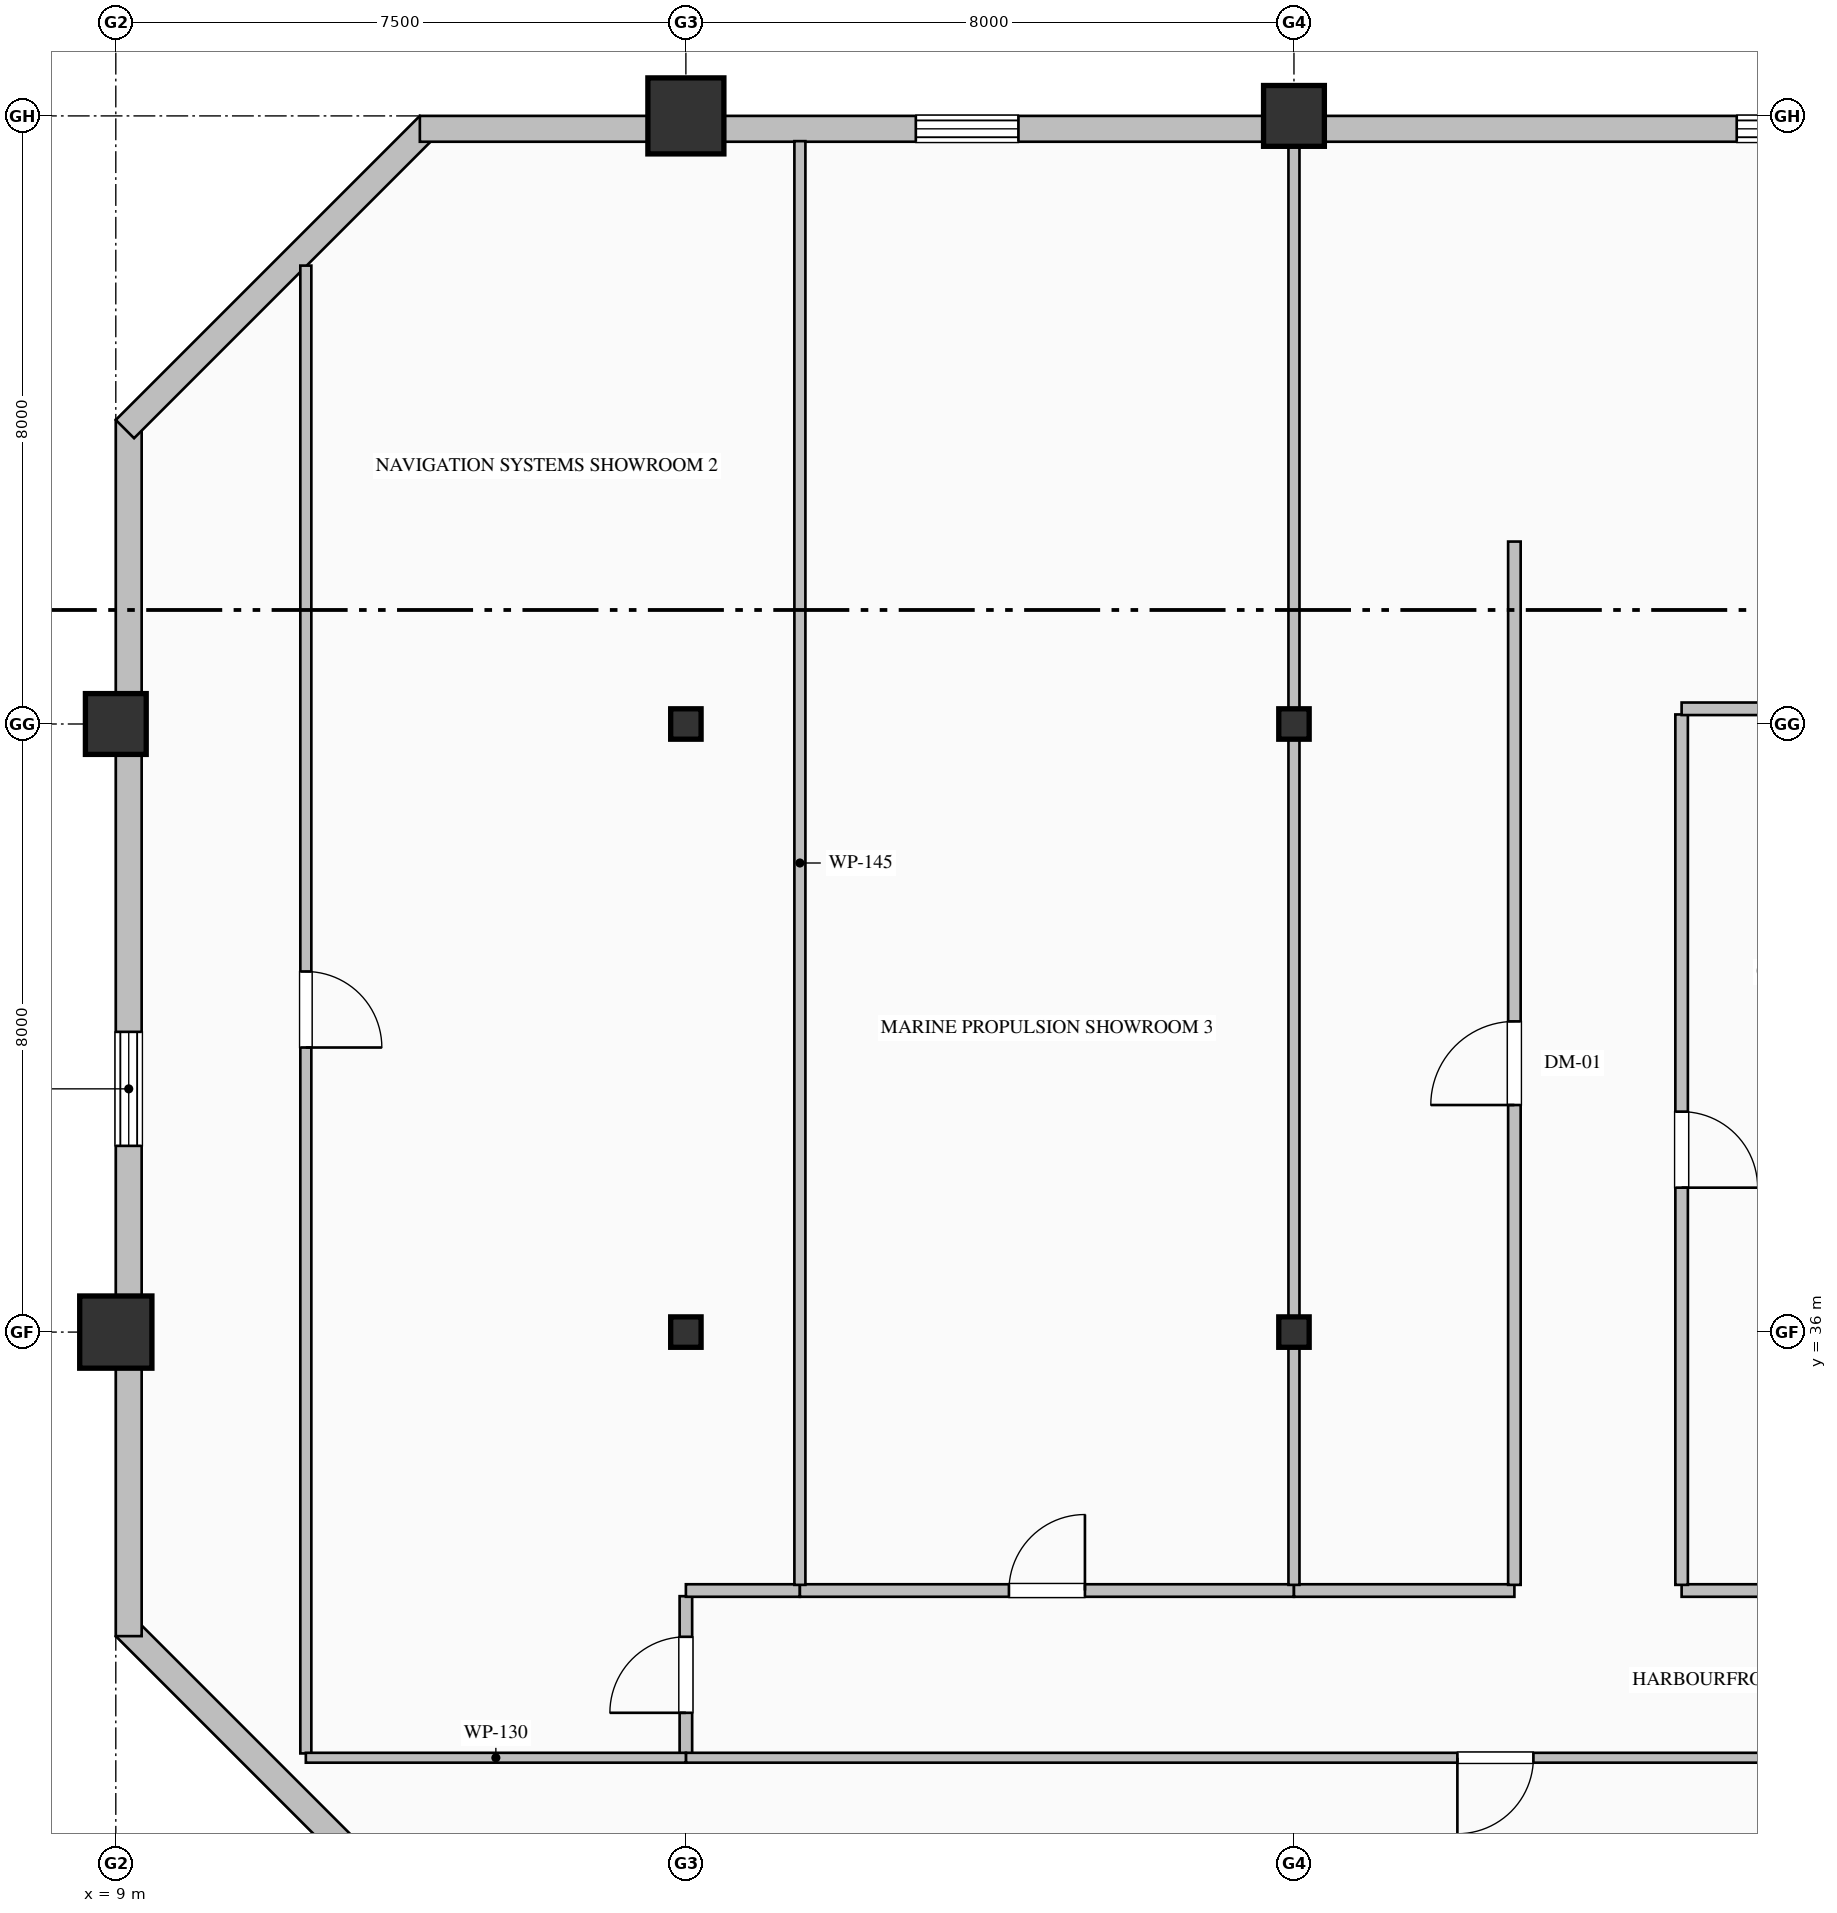
"""IFC4 building model, lengths in metres.
Left out: names, types, materials, properties, quantities, classifications, styles, units other than length and angle.
Written with IfcOpenShell. Run it as: python <this file> out.ifc"""

import sys

from ifc_helpers import new_model, si_unit, direction, frame, frame_2d, origin, origin_2d, place, context, subcontext, project, spatial, rectangle, hollow_rectangle, hollow_circle, i_section, extrude, element, fill, save


model = new_model("IFC4")
c1 = context("Model", 3, precision=1e-05, world=origin(), true_north=direction((0.0, 1.0)))
c2 = subcontext(c1, "Body", "Model", "MODEL_VIEW")
j1 = project(units=[si_unit("LENGTHUNIT", "METRE"), si_unit("PLANEANGLEUNIT", "RADIAN")], contexts=[c1])
p1 = place(None, origin())
s1 = spatial("IfcSite", under=j1, at=p1, CompositionType="ELEMENT")
p2 = place(p1, origin())
s2 = spatial("IfcBuilding", under=s1, at=p2, CompositionType="ELEMENT")
p3 = place(p2, frame((0.0, 0.0, 265.8)))
s3 = spatial("IfcBuildingStorey", under=s2, at=p3, CompositionType="ELEMENT", Elevation=265.8)
p4 = place(p3, frame((9.0, 36.0, 0.0), z_axis=(0.0, 0.0, 1.0), x_axis=(1.0, 0.0, 0.0)))
e1 = element("IfcColumn", 1, at=p4, inside=s3, PredefinedType="COLUMN", context=c2, shape_type="SweptSolid", body=[
    extrude(hollow_rectangle(XDim=0.95, YDim=0.95, WallThickness=0.036, at=origin_2d()), origin(), (0.0, 0.0, 1.0), 4.0),
])
p5 = place(p3, frame((9.0, 44.0, 0.0), z_axis=(0.0, 0.0, 1.0), x_axis=(1.0, 0.0, 0.0)))
e2 = element("IfcColumn", 2, at=p5, inside=s3, PredefinedType="COLUMN", context=c2, shape_type="SweptSolid", body=[
    extrude(hollow_rectangle(XDim=0.8, YDim=0.8, WallThickness=0.032, at=origin_2d()), origin(), (0.0, 0.0, 1.0), 4.0),
])
for number, where, z_axis, x_axis in (
    (3, (16.5, 36.0, 0.0), (0.0, 0.0, 1.0), (1.0, 0.0, 0.0)),
    (4, (16.5, 44.0, 0.0), (0.0, 0.0, 1.0), (1.0, 0.0, 0.0)),
):
    element("IfcColumn", number, at=place(p3, frame(where, z_axis=z_axis, x_axis=x_axis)), inside=s3, PredefinedType="COLUMN", context=c2, shape_type="SweptSolid", body=[
        extrude(i_section(OverallWidth=0.4, OverallDepth=0.4, WebThickness=0.013, FlangeThickness=0.021, FilletRadius=0.022, at=origin_2d()), origin(), (0.0, 0.0, 1.0), 4.0),
    ])
p6 = place(p3, frame((16.5, 52.0, 0.0), z_axis=(0.0, 0.0, 1.0), x_axis=(1.0, 0.0, 0.0)))
e5 = element("IfcColumn", 5, at=p6, inside=s3, PredefinedType="COLUMN", context=c2, shape_type="SweptSolid", body=[
    extrude(hollow_circle(Radius=0.5, WallThickness=0.036, at=origin_2d()), origin(), (0.0, 0.0, 1.0), 4.0),
])
for number, where, z_axis, x_axis in (
    (6, (24.5, 36.0, 0.0), (0.0, 0.0, 1.0), (1.0, 0.0, 0.0)),
    (7, (24.5, 44.0, 0.0), (0.0, 0.0, 1.0), (1.0, 0.0, 0.0)),
):
    element("IfcColumn", number, at=place(p3, frame(where, z_axis=z_axis, x_axis=x_axis)), inside=s3, PredefinedType="COLUMN", context=c2, shape_type="SweptSolid", body=[
        extrude(i_section(OverallWidth=0.4, OverallDepth=0.4, WebThickness=0.013, FlangeThickness=0.021, FilletRadius=0.022, at=origin_2d()), origin(), (0.0, 0.0, 1.0), 4.0),
    ])
p7 = place(p3, frame((24.5, 52.0, 0.0), z_axis=(0.0, 0.0, 1.0), x_axis=(1.0, 0.0, 0.0)))
e8 = element("IfcColumn", 8, at=p7, inside=s3, PredefinedType="COLUMN", context=c2, shape_type="SweptSolid", body=[
    extrude(hollow_rectangle(XDim=0.8, YDim=0.8, WallThickness=0.032, at=origin_2d()), origin(), (0.0, 0.0, 1.0), 4.0),
])
p8 = place(p3, frame((13.12, 28.12, 0.0), z_axis=(0.0, 0.0, 1.0), x_axis=(-0.707106781187, 0.707106781187, 0.0)))
e9 = element("IfcWall", 9, at=p8, inside=s3, PredefinedType="SOLIDWALL", context=c2, shape_type="SweptSolid", body=[
    extrude(rectangle(XDim=5.657, YDim=0.34, at=frame_2d((2.828, 0.0))), origin(), (0.0, 0.0, 1.0), 3.775),
])
p9 = place(p3, frame((9.17, 32.0, 0.0), z_axis=(0.0, 0.0, 1.0), x_axis=(0.0, 1.0, 0.0)))
e10 = element("IfcWall", 10, at=p9, inside=s3, PredefinedType="SOLIDWALL", context=c2, shape_type="SweptSolid", body=[
    extrude(rectangle(XDim=16.0, YDim=0.34, at=frame_2d((8.0, 0.0))), origin(), (0.0, 0.0, 1.0), 3.325),
])
p10 = place(p9, frame((6.45, 0.0, 0.7)))
e11 = element("IfcOpeningElement", 11, at=p10, cuts=e10, PredefinedType="OPENING", context=c2, shape_type="SweptSolid", body=[
    extrude(rectangle(XDim=1.5, YDim=2.4, at=frame_2d((0.75, 1.2))), frame((0.0, 0.18, 0.0), z_axis=(0.0, -1.0, 0.0), x_axis=(1.0, 0.0, 0.0)), (0.0, 0.0, 1.0), 0.36),
])
p11 = place(p3, frame((9.12, 47.88, 0.0), z_axis=(0.0, 0.0, 1.0), x_axis=(0.707106781187, 0.707106781187, 0.0)))
e12 = element("IfcWall", 12, at=p11, inside=s3, PredefinedType="SOLIDWALL", context=c2, shape_type="SweptSolid", body=[
    extrude(rectangle(XDim=5.657, YDim=0.34, at=frame_2d((2.828, 0.0))), origin(), (0.0, 0.0, 1.0), 3.775),
])
p12 = place(p3, frame((13.0, 51.83, 0.0), z_axis=(0.0, 0.0, 1.0), x_axis=(1.0, 0.0, 0.0)))
e13 = element("IfcWall", 13, at=p12, inside=s3, PredefinedType="SOLIDWALL", context=c2, shape_type="SweptSolid", body=[
    extrude(rectangle(XDim=27.52, YDim=0.34, at=frame_2d((13.76, 0.0))), origin(), (0.0, 0.0, 1.0), 3.325),
])
p13 = place(p12, frame((6.525, 0.0, 0.9)))
e14 = element("IfcOpeningElement", 14, at=p13, cuts=e13, PredefinedType="OPENING", context=c2, shape_type="SweptSolid", body=[
    extrude(rectangle(XDim=1.35, YDim=1.85, at=frame_2d((0.675, 0.925))), frame((0.0, 0.18, 0.0), z_axis=(0.0, -1.0, 0.0), x_axis=(1.0, 0.0, 0.0)), (0.0, 0.0, 1.0), 0.36),
])
p14 = place(p12, frame((17.325, 0.0, 0.9)))
e15 = element("IfcOpeningElement", 15, at=p14, cuts=e13, PredefinedType="OPENING", context=c2, shape_type="SweptSolid", body=[
    extrude(rectangle(XDim=1.35, YDim=1.85, at=frame_2d((0.675, 0.925))), frame((0.0, 0.18, 0.0), z_axis=(0.0, -1.0, 0.0), x_axis=(1.0, 0.0, 0.0)), (0.0, 0.0, 1.0), 0.36),
])
p15 = place(p3, frame((16.5, 30.457, 0.0), z_axis=(0.0, 0.0, 1.0), x_axis=(0.0, 1.0, 0.0)))
e16 = element("IfcWall", 16, at=p15, inside=s3, PredefinedType="PARTITIONING", context=c2, shape_type="SweptSolid", body=[
    extrude(rectangle(XDim=2.068, YDim=0.165, at=frame_2d((1.034, 0.0))), origin(), (0.0, 0.0, 1.0), 3.179),
])
p16 = place(p15, frame((0.534, 0.0, 0.0)))
e17 = element("IfcOpeningElement", 17, at=p16, cuts=e16, PredefinedType="OPENING", context=c2, shape_type="SweptSolid", body=[
    extrude(rectangle(XDim=1.0, YDim=2.15, at=frame_2d((0.5, 1.075))), frame((0.0, 0.093, 0.0), z_axis=(0.0, -1.0, 0.0), x_axis=(1.0, 0.0, 0.0)), (0.0, 0.0, 1.0), 0.185),
])
p17 = place(p3, frame((16.5, 32.6, 0.0), z_axis=(0.0, 0.0, 1.0), x_axis=(1.0, 0.0, 0.0)))
e18 = element("IfcWall", 18, at=p17, inside=s3, PredefinedType="PARTITIONING", context=c2, shape_type="SweptSolid", body=[
    extrude(rectangle(XDim=1.5, YDim=0.165, at=frame_2d((0.75, 0.0))), origin(), (0.0, 0.0, 1.0), 3.775),
])
p18 = place(p3, frame((18.0, 32.6, 0.0), z_axis=(0.0, 0.0, 1.0), x_axis=(1.0, 0.0, 0.0)))
e19 = element("IfcWall", 19, at=p18, inside=s3, PredefinedType="PARTITIONING", context=c2, shape_type="SweptSolid", body=[
    extrude(rectangle(XDim=6.5, YDim=0.165, at=frame_2d((3.25, 0.0))), origin(), (0.0, 0.0, 1.0), 3.775),
])
p19 = place(p18, frame((2.75, 0.0, 0.0)))
e20 = element("IfcOpeningElement", 20, at=p19, cuts=e19, PredefinedType="OPENING", context=c2, shape_type="SweptSolid", body=[
    extrude(rectangle(XDim=1.0, YDim=2.15, at=frame_2d((0.5, 1.075))), frame((0.0, 0.093, 0.0), z_axis=(0.0, -1.0, 0.0), x_axis=(1.0, 0.0, 0.0)), (0.0, 0.0, 1.0), 0.185),
])
p20 = place(p3, frame((24.5, 32.6, 0.0), z_axis=(0.0, 0.0, 1.0), x_axis=(1.0, 0.0, 0.0)))
e21 = element("IfcWall", 21, at=p20, inside=s3, PredefinedType="PARTITIONING", context=c2, shape_type="SweptSolid", body=[
    extrude(rectangle(XDim=2.9, YDim=0.165, at=frame_2d((1.45, 0.0))), origin(), (0.0, 0.0, 1.0), 3.775),
])
p21 = place(p3, frame((29.6, 32.6, 0.0), z_axis=(0.0, 0.0, 1.0), x_axis=(1.0, 0.0, 0.0)))
e22 = element("IfcWall", 22, at=p21, inside=s3, PredefinedType="PARTITIONING", context=c2, shape_type="SweptSolid", body=[
    extrude(rectangle(XDim=4.2, YDim=0.165, at=frame_2d((2.1, 0.0))), origin(), (0.0, 0.0, 1.0), 3.775),
])
p22 = place(p3, frame((37.8, 30.4, 0.0), z_axis=(0.0, 0.0, 1.0), x_axis=(-1.0, 0.0, 0.0)))
e23 = element("IfcWall", 23, at=p22, inside=s3, PredefinedType="PARTITIONING", context=c2, shape_type="SweptSolid", body=[
    extrude(rectangle(XDim=21.3, YDim=0.13, at=frame_2d((10.65, 0.0))), origin(), (0.0, 0.0, 1.0), 3.775),
])
p23 = place(p22, frame((10.15, 0.0, 0.0)))
e24 = element("IfcOpeningElement", 24, at=p23, cuts=e23, PredefinedType="OPENING", context=c2, shape_type="SweptSolid", body=[
    extrude(rectangle(XDim=1.0, YDim=2.15, at=frame_2d((0.5, 1.075))), frame((0.0, 0.075, 0.0), z_axis=(0.0, -1.0, 0.0), x_axis=(1.0, 0.0, 0.0)), (0.0, 0.0, 1.0), 0.15),
])
p24 = place(p3, frame((27.4, 32.675, 0.0), z_axis=(0.0, 0.0, 1.0), x_axis=(0.0, 1.0, 0.0)))
e25 = element("IfcWall", 25, at=p24, inside=s3, PredefinedType="PARTITIONING", context=c2, shape_type="SweptSolid", body=[
    extrude(rectangle(XDim=13.725, YDim=0.165, at=frame_2d((6.863, 0.0))), origin(), (0.0, 0.0, 1.0), 3.775),
])
p25 = place(p24, frame((6.313, 0.0, 0.0)))
e26 = element("IfcOpeningElement", 26, at=p25, cuts=e25, PredefinedType="OPENING", context=c2, shape_type="SweptSolid", body=[
    extrude(rectangle(XDim=1.1, YDim=2.2, at=frame_2d((0.55, 1.1))), frame((0.0, 0.093, 0.0), z_axis=(0.0, -1.0, 0.0), x_axis=(1.0, 0.0, 0.0)), (0.0, 0.0, 1.0), 0.185),
])
p26 = place(p3, frame((29.6, 44.125, 0.0), z_axis=(0.0, 0.0, 1.0), x_axis=(0.0, -1.0, 0.0)))
e27 = element("IfcWall", 27, at=p26, inside=s3, PredefinedType="PARTITIONING", context=c2, shape_type="SweptSolid", body=[
    extrude(rectangle(XDim=11.451, YDim=0.165, at=frame_2d((5.726, 0.0))), origin(), (0.0, 0.0, 1.0), 3.775),
])
p27 = place(p26, frame((5.226, 0.0, 0.0)))
e28 = element("IfcOpeningElement", 28, at=p27, cuts=e27, PredefinedType="OPENING", context=c2, shape_type="SweptSolid", body=[
    extrude(rectangle(XDim=1.0, YDim=2.15, at=frame_2d((0.5, 1.075))), frame((0.0, 0.093, 0.0), z_axis=(0.0, -1.0, 0.0), x_axis=(1.0, 0.0, 0.0)), (0.0, 0.0, 1.0), 0.185),
])
p28 = place(p3, frame((33.8, 44.2, 0.0), z_axis=(0.0, 0.0, 1.0), x_axis=(-1.0, 0.0, 0.0)))
e29 = element("IfcWall", 29, at=p28, inside=s3, PredefinedType="PARTITIONING", context=c2, shape_type="SweptSolid", body=[
    extrude(rectangle(XDim=4.2, YDim=0.165, at=frame_2d((2.1, 0.0))), origin(), (0.0, 0.0, 1.0), 3.775),
])
p29 = place(p3, frame((11.5, 50.031, 0.0), z_axis=(0.0, 0.0, 1.0), x_axis=(0.0, -1.0, 0.0)))
e30 = element("IfcWall", 30, at=p29, inside=s3, PredefinedType="PARTITIONING", context=c2, shape_type="SweptSolid", body=[
    extrude(rectangle(XDim=19.573, YDim=0.145, at=frame_2d((9.787, 0.0))), origin(), (0.0, 0.0, 1.0), 3.775),
])
p30 = place(p29, frame((9.287, 0.0, 0.0)))
e31 = element("IfcOpeningElement", 31, at=p30, cuts=e30, PredefinedType="OPENING", context=c2, shape_type="SweptSolid", body=[
    extrude(rectangle(XDim=1.0, YDim=2.15, at=frame_2d((0.5, 1.075))), frame((0.0, 0.083, 0.0), z_axis=(0.0, -1.0, 0.0), x_axis=(1.0, 0.0, 0.0)), (0.0, 0.0, 1.0), 0.165),
])
p31 = place(p3, frame((18.0, 51.668, 0.0), z_axis=(0.0, 0.0, 1.0), x_axis=(0.0, -1.0, 0.0)))
e32 = element("IfcWall", 32, at=p31, inside=s3, PredefinedType="PARTITIONING", context=c2, shape_type="SweptSolid", body=[
    extrude(rectangle(XDim=18.993, YDim=0.145, at=frame_2d((9.497, 0.0))), origin(), (0.0, 0.0, 1.0), 3.775),
])
p32 = place(p3, frame((16.5, 30.4, 0.0), z_axis=(0.0, 0.0, 1.0), x_axis=(-1.0, 0.0, 0.0)))
e33 = element("IfcWall", 33, at=p32, inside=s3, PredefinedType="PARTITIONING", context=c2, shape_type="SweptSolid", body=[
    extrude(rectangle(XDim=5.0, YDim=0.13, at=frame_2d((2.5, 0.0))), origin(), (0.0, 0.0, 1.0), 3.775),
])
p33 = place(p3, frame((24.5, 51.668, 0.0), z_axis=(0.0, 0.0, 1.0), x_axis=(0.0, -1.0, 0.0)))
e34 = element("IfcWall", 34, at=p33, inside=s3, PredefinedType="PARTITIONING", context=c2, shape_type="SweptSolid", body=[
    extrude(rectangle(XDim=18.993, YDim=0.145, at=frame_2d((9.497, 0.0))), origin(), (0.0, 0.0, 1.0), 3.179),
])
p34 = place(p10, origin())
e35 = element("IfcWindow", 35, at=p34, inside=s3, PartitioningType="DOUBLE_PANEL_HORIZONTAL", PredefinedType="WINDOW", context=c2, shape_type="SweptSolid", body=[
    extrude(rectangle(XDim=1.5, YDim=2.4, at=frame_2d((0.75, 1.2))), frame((0.0, 0.15, 0.0), z_axis=(0.0, -1.0, 0.0), x_axis=(1.0, 0.0, 0.0)), (0.0, 0.0, 1.0), 0.06),
])
fill(e11, e35)
p35 = place(p13, origin())
e36 = element("IfcWindow", 36, at=p35, inside=s3, PartitioningType="DOUBLE_PANEL_VERTICAL", PredefinedType="WINDOW", context=c2, shape_type="SweptSolid", body=[
    extrude(rectangle(XDim=1.35, YDim=1.85, at=frame_2d((0.675, 0.925))), frame((0.0, 0.15, 0.0), z_axis=(0.0, -1.0, 0.0), x_axis=(1.0, 0.0, 0.0)), (0.0, 0.0, 1.0), 0.06),
])
fill(e14, e36)
p36 = place(p14, origin())
e37 = element("IfcWindow", 37, at=p36, inside=s3, PartitioningType="DOUBLE_PANEL_VERTICAL", PredefinedType="WINDOW", context=c2, shape_type="SweptSolid", body=[
    extrude(rectangle(XDim=1.35, YDim=1.85, at=frame_2d((0.675, 0.925))), frame((0.0, 0.15, 0.0), z_axis=(0.0, -1.0, 0.0), x_axis=(1.0, 0.0, 0.0)), (0.0, 0.0, 1.0), 0.06),
])
fill(e15, e37)
p37 = place(p30, origin())
e38 = element("IfcDoor", 38, at=p37, inside=s3, OperationType="SINGLE_SWING_RIGHT", PredefinedType="DOOR", context=c2, shape_type="SweptSolid", body=[
    extrude(rectangle(XDim=1.0, YDim=2.15, at=frame_2d((0.5, 1.075))), frame((0.0, 0.025, 0.0), z_axis=(0.0, -1.0, 0.0), x_axis=(1.0, 0.0, 0.0)), (0.0, 0.0, 1.0), 0.05),
])
fill(e31, e38)
p38 = place(p16, origin())
e39 = element("IfcDoor", 39, at=p38, inside=s3, OperationType="SINGLE_SWING_LEFT", PredefinedType="DOOR", context=c2, shape_type="SweptSolid", body=[
    extrude(rectangle(XDim=1.0, YDim=2.15, at=frame_2d((0.5, 1.075))), frame((0.0, 0.025, 0.0), z_axis=(0.0, -1.0, 0.0), x_axis=(1.0, 0.0, 0.0)), (0.0, 0.0, 1.0), 0.05),
])
fill(e17, e39)
p39 = place(p19, origin())
e40 = element("IfcDoor", 40, at=p39, inside=s3, OperationType="SINGLE_SWING_RIGHT", PredefinedType="DOOR", context=c2, shape_type="SweptSolid", body=[
    extrude(rectangle(XDim=1.0, YDim=2.15, at=frame_2d((0.5, 1.075))), frame((0.0, 0.025, 0.0), z_axis=(0.0, -1.0, 0.0), x_axis=(1.0, 0.0, 0.0)), (0.0, 0.0, 1.0), 0.05),
])
fill(e20, e40)
p40 = place(p25, origin())
e41 = element("IfcDoor", 41, at=p40, inside=s3, OperationType="SINGLE_SWING_LEFT", PredefinedType="DOOR", context=c2, shape_type="SweptSolid", body=[
    extrude(rectangle(XDim=1.1, YDim=2.2, at=frame_2d((0.55, 1.1))), frame((0.0, 0.025, 0.0), z_axis=(0.0, -1.0, 0.0), x_axis=(1.0, 0.0, 0.0)), (0.0, 0.0, 1.0), 0.05),
])
fill(e26, e41)
p41 = place(p27, origin())
e42 = element("IfcDoor", 42, at=p41, inside=s3, OperationType="SINGLE_SWING_RIGHT", PredefinedType="DOOR", context=c2, shape_type="SweptSolid", body=[
    extrude(rectangle(XDim=1.0, YDim=2.15, at=frame_2d((0.5, 1.075))), frame((0.0, 0.025, 0.0), z_axis=(0.0, -1.0, 0.0), x_axis=(1.0, 0.0, 0.0)), (0.0, 0.0, 1.0), 0.05),
])
fill(e28, e42)
p42 = place(p23, origin())
e43 = element("IfcDoor", 43, at=p42, inside=s3, OperationType="SINGLE_SWING_RIGHT", PredefinedType="DOOR", context=c2, shape_type="SweptSolid", body=[
    extrude(rectangle(XDim=1.0, YDim=2.15, at=frame_2d((0.5, 1.075))), frame((0.0, 0.025, 0.0), z_axis=(0.0, -1.0, 0.0), x_axis=(1.0, 0.0, 0.0)), (0.0, 0.0, 1.0), 0.05),
])
fill(e24, e43)
save(model, sys.argv[1])
